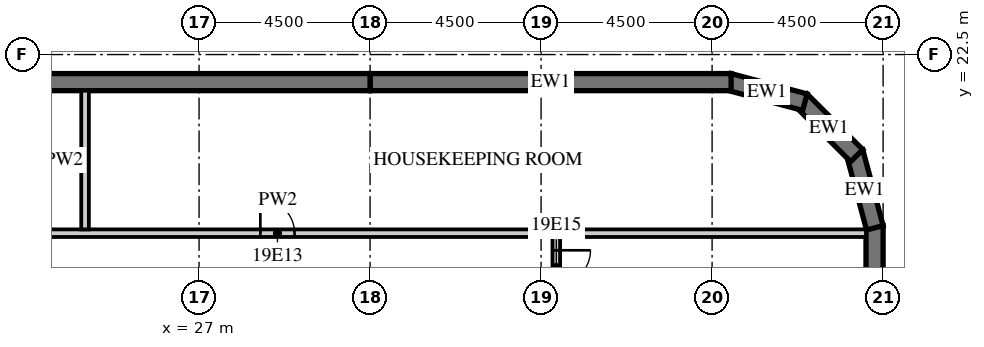
"""IFC4 building model, lengths in metres.
Left out: names, types, materials, properties, quantities, classifications, styles, units other than length and angle.
Written with IfcOpenShell. Run it as: python <this file> out.ifc"""

import sys

from ifc_helpers import new_model, si_unit, direction, frame, frame_2d, origin, place, context, subcontext, project, spatial, polyline, rectangle, outline, extrude, element, fill, save


model = new_model("IFC4")
c1 = context("Model", 3, precision=1e-05, world=origin(), true_north=direction((0.0, 1.0)))
c2 = subcontext(c1, "Body", "Model", "MODEL_VIEW")
j1 = project(units=[si_unit("LENGTHUNIT", "METRE"), si_unit("PLANEANGLEUNIT", "RADIAN")], contexts=[c1])
p1 = place(None, origin())
s1 = spatial("IfcSite", under=j1, at=p1, CompositionType="ELEMENT")
p2 = place(p1, origin())
s2 = spatial("IfcBuilding", under=s1, at=p2, CompositionType="ELEMENT")
p3 = place(p2, frame((0.0, 0.0, 93.0)))
s3 = spatial("IfcBuildingStorey", under=s2, at=p3, CompositionType="ELEMENT", Elevation=93.0)
p4 = place(p3, frame((44.775, -18.0, 0.0), z_axis=(0.0, 0.0, 1.0), x_axis=(0.0, 1.0, 0.0)))
e1 = element("IfcWall", 1, at=p4, inside=s3, PredefinedType="SOLIDWALL", context=c2, shape_type="SweptSolid", body=[
    extrude(rectangle(XDim=36.0, YDim=0.45, at=frame_2d((18.0, 0.0))), origin(), (0.0, 0.0, 1.0), 3.02),
])
p5 = place(p4, frame((3.9, 0.0, 0.45)))
e2 = element("IfcOpeningElement", 2, at=p5, cuts=e1, PredefinedType="OPENING", context=c2, shape_type="SweptSolid", body=[
    extrude(rectangle(XDim=3.3, YDim=2.25, at=frame_2d((1.65, 1.125))), frame((0.0, 0.235, 0.0), z_axis=(0.0, -1.0, 0.0), x_axis=(1.0, 0.0, 0.0)), (0.0, 0.0, 1.0), 0.47),
])
p6 = place(p4, frame((8.4, 0.0, 0.45)))
e3 = element("IfcOpeningElement", 3, at=p6, cuts=e1, PredefinedType="OPENING", context=c2, shape_type="SweptSolid", body=[
    extrude(rectangle(XDim=3.3, YDim=2.25, at=frame_2d((1.65, 1.125))), frame((0.0, 0.235, 0.0), z_axis=(0.0, -1.0, 0.0), x_axis=(1.0, 0.0, 0.0)), (0.0, 0.0, 1.0), 0.47),
])
p7 = place(p4, frame((12.9, 0.0, 0.45)))
e4 = element("IfcOpeningElement", 4, at=p7, cuts=e1, PredefinedType="OPENING", context=c2, shape_type="SweptSolid", body=[
    extrude(rectangle(XDim=3.3, YDim=2.25, at=frame_2d((1.65, 1.125))), frame((0.0, 0.235, 0.0), z_axis=(0.0, -1.0, 0.0), x_axis=(1.0, 0.0, 0.0)), (0.0, 0.0, 1.0), 0.47),
])
p8 = place(p3, frame((44.783, 17.942, 0.0), z_axis=(0.0, 0.0, 1.0), x_axis=(-0.25881466832, 0.965926999034, 0.0)))
e5 = element("IfcWall", 5, at=p8, inside=s3, PredefinedType="SOLIDWALL", context=c2, shape_type="SweptSolid", body=[
    extrude(outline(polyline([(0.0, -0.225), (2.071, -0.225), (1.95, 0.225), (0.121, 0.225), (0.0, -0.225)])), origin(), (0.0, 0.0, 1.0), 3.02),
])
p9 = place(p3, frame((44.305, 19.841, 0.0), z_axis=(0.0, 0.0, 1.0), x_axis=(-0.707106781187, 0.707106781187, 0.0)))
e6 = element("IfcWall", 6, at=p9, inside=s3, PredefinedType="SOLIDWALL", context=c2, shape_type="SweptSolid", body=[
    extrude(outline(polyline([(0.0, -0.225), (2.071, -0.225), (1.95, 0.225), (0.121, 0.225), (0.0, -0.225)])), origin(), (0.0, 0.0, 1.0), 3.02),
])
p10 = place(p3, frame((42.942, 21.247, 0.0), z_axis=(0.0, 0.0, 1.0), x_axis=(-0.965926999034, 0.25881466832, 0.0)))
e7 = element("IfcWall", 7, at=p10, inside=s3, PredefinedType="SOLIDWALL", context=c2, shape_type="SweptSolid", body=[
    extrude(outline(polyline([(-0.0, -0.225), (2.07, -0.225), (1.95, 0.225), (0.12, 0.225), (-0.0, -0.225)])), origin(), (0.0, 0.0, 1.0), 3.02),
])
p11 = place(p3, frame((41.0, 21.775, 0.0), z_axis=(0.0, 0.0, 1.0), x_axis=(-1.0, 0.0, 0.0)))
e8 = element("IfcWall", 8, at=p11, inside=s3, PredefinedType="SOLIDWALL", context=c2, shape_type="SweptSolid", body=[
    extrude(rectangle(XDim=9.5, YDim=0.45, at=frame_2d((4.75, 0.0))), origin(), (0.0, 0.0, 1.0), 3.02),
])
p12 = place(p3, frame((31.5, 21.775, 0.0), z_axis=(0.0, 0.0, 1.0), x_axis=(-1.0, 0.0, 0.0)))
e9 = element("IfcWall", 9, at=p12, inside=s3, PredefinedType="SOLIDWALL", context=c2, shape_type="SweptSolid", body=[
    extrude(rectangle(XDim=18.0, YDim=0.45, at=frame_2d((9.0, 0.0))), origin(), (0.0, 0.0, 1.0), 3.02),
])
p13 = place(p3, frame((36.4, 1.75, 0.0), z_axis=(0.0, 0.0, 1.0), x_axis=(0.0, 1.0, 0.0)))
e10 = element("IfcWall", 10, at=p13, inside=s3, PredefinedType="PARTITIONING", context=c2, shape_type="SweptSolid", body=[
    extrude(rectangle(XDim=15.95, YDim=0.2, at=frame_2d((7.975, 0.0))), origin(), (0.0, 0.0, 1.0), 3.02),
])
p14 = place(p13, frame((14.7, 0.0, 0.0)))
e11 = element("IfcOpeningElement", 11, at=p14, cuts=e10, PredefinedType="OPENING", context=c2, shape_type="SweptSolid", body=[
    extrude(rectangle(XDim=0.9, YDim=2.1, at=frame_2d((0.45, 1.05))), frame((0.0, 0.11, 0.0), z_axis=(0.0, -1.0, 0.0), x_axis=(1.0, 0.0, 0.0)), (0.0, 0.0, 1.0), 0.22),
])
p15 = place(p3, frame((13.6, 17.8, 0.0), z_axis=(0.0, 0.0, 1.0), x_axis=(1.0, 0.0, 0.0)))
e12 = element("IfcWall", 12, at=p15, inside=s3, PredefinedType="PARTITIONING", context=c2, shape_type="SweptSolid", body=[
    extrude(rectangle(XDim=30.95, YDim=0.2, at=frame_2d((15.475, 0.0))), origin(), (0.0, 0.0, 1.0), 3.02),
])
p16 = place(p15, frame((15.012, 0.0, 0.0)))
e13 = element("IfcOpeningElement", 13, at=p16, cuts=e12, PredefinedType="OPENING", context=c2, shape_type="SweptSolid", body=[
    extrude(rectangle(XDim=0.9, YDim=2.1, at=frame_2d((0.45, 1.05))), frame((0.0, 0.11, 0.0), z_axis=(0.0, -1.0, 0.0), x_axis=(1.0, 0.0, 0.0)), (0.0, 0.0, 1.0), 0.22),
])
p17 = place(p15, frame((6.712, 0.0, 0.0)))
e14 = element("IfcOpeningElement", 14, at=p17, cuts=e12, PredefinedType="OPENING", context=c2, shape_type="SweptSolid", body=[
    extrude(rectangle(XDim=0.9, YDim=2.1, at=frame_2d((0.45, 1.05))), frame((0.0, 0.11, 0.0), z_axis=(0.0, -1.0, 0.0), x_axis=(1.0, 0.0, 0.0)), (0.0, 0.0, 1.0), 0.22),
])
p18 = place(p3, frame((24.0, 17.9, 0.0), z_axis=(0.0, 0.0, 1.0), x_axis=(0.0, 1.0, 0.0)))
e15 = element("IfcWall", 15, at=p18, inside=s3, PredefinedType="PARTITIONING", context=c2, shape_type="SweptSolid", body=[
    extrude(rectangle(XDim=3.65, YDim=0.2, at=frame_2d((1.825, 0.0))), origin(), (0.0, 0.0, 1.0), 3.02),
])
p19 = place(p16, origin())
e16 = element("IfcDoor", 16, at=p19, inside=s3, OperationType="SINGLE_SWING_LEFT", PredefinedType="DOOR", context=c2, shape_type="SweptSolid", body=[
    extrude(rectangle(XDim=0.9, YDim=2.1, at=frame_2d((0.45, 1.05))), frame((0.0, 0.025, 0.0), z_axis=(0.0, -1.0, 0.0), x_axis=(1.0, 0.0, 0.0)), (0.0, 0.0, 1.0), 0.05),
])
fill(e13, e16)
p20 = place(p14, origin())
e17 = element("IfcDoor", 17, at=p20, inside=s3, OperationType="SINGLE_SWING_RIGHT", PredefinedType="DOOR", context=c2, shape_type="SweptSolid", body=[
    extrude(rectangle(XDim=0.9, YDim=2.1, at=frame_2d((0.45, 1.05))), frame((0.0, 0.025, 0.0), z_axis=(0.0, -1.0, 0.0), x_axis=(1.0, 0.0, 0.0)), (0.0, 0.0, 1.0), 0.05),
])
fill(e11, e17)
save(model, sys.argv[1])
